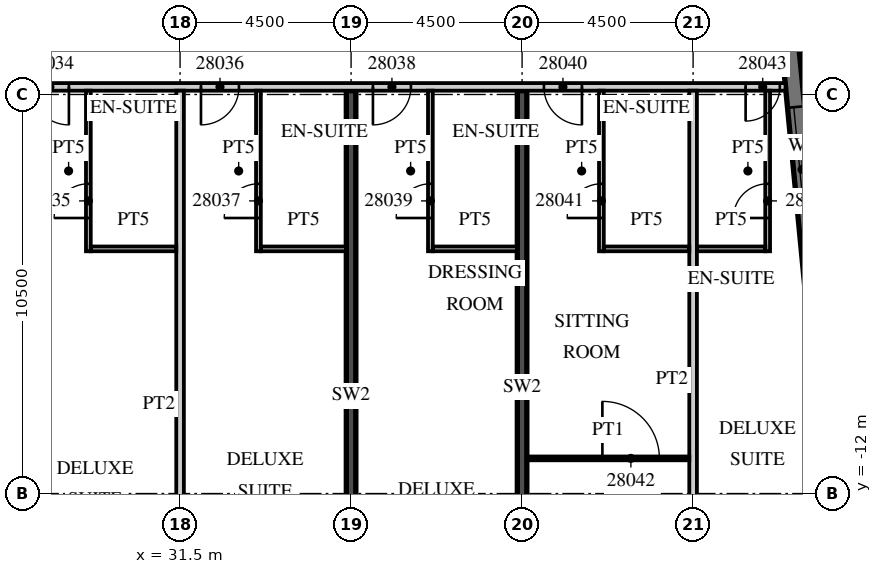
"""IFC4 building model, lengths in metres.
Left out: names, types, materials, properties, quantities, classifications, styles, units other than length and angle.
Written with IfcOpenShell. Run it as: python <this file> out.ifc"""

import sys

from ifc_helpers import new_model, si_unit, direction, frame, frame_2d, origin, place, context, subcontext, project, spatial, rectangle, extrude, element, fill, save


model = new_model("IFC4")
c1 = context("Model", 3, precision=1e-05, world=origin(), true_north=direction((0.0, 1.0)))
c2 = subcontext(c1, "Body", "Model", "MODEL_VIEW")
j1 = project(units=[si_unit("LENGTHUNIT", "METRE"), si_unit("PLANEANGLEUNIT", "RADIAN")], contexts=[c1])
p1 = place(None, origin())
s1 = spatial("IfcSite", under=j1, at=p1, CompositionType="ELEMENT")
p2 = place(p1, origin())
s2 = spatial("IfcBuilding", under=s1, at=p2, CompositionType="ELEMENT")
p3 = place(p2, frame((0.0, 0.0, 127.3)))
s3 = spatial("IfcBuildingStorey", under=s2, at=p3, CompositionType="ELEMENT", Elevation=127.3)
p4 = place(p3, frame((36.0, -17.444, 0.0), z_axis=(0.0, 0.0, 1.0), x_axis=(0.0, 1.0, 0.0)))
e1 = element("IfcWall", 1, at=p4, inside=s3, PredefinedType="SHEAR", context=c2, shape_type="SweptSolid", body=[
    extrude(rectangle(XDim=16.044, YDim=0.25, at=frame_2d((8.022, 0.0))), origin(), (0.0, 0.0, 1.0), 3.3),
])
p5 = place(p3, frame((40.5, -17.011, 0.0), z_axis=(0.0, 0.0, 1.0), x_axis=(0.0, 1.0, 0.0)))
e2 = element("IfcWall", 2, at=p5, inside=s3, PredefinedType="SHEAR", context=c2, shape_type="SweptSolid", body=[
    extrude(rectangle(XDim=15.611, YDim=0.25, at=frame_2d((7.805, 0.0))), origin(), (0.0, 0.0, 1.0), 3.3),
])
p6 = place(p3, frame((48.753, -12.672, 0.0), z_axis=(0.0, 0.0, 1.0), x_axis=(-0.095842661909, 0.995396495954, 0.0)))
e3 = element("IfcWall", 3, at=p6, inside=s3, PredefinedType="SOLIDWALL", context=c2, shape_type="SweptSolid", body=[
    extrude(rectangle(XDim=35.0, YDim=0.45, at=frame_2d((17.5, 0.0))), origin(), (0.0, 0.0, 1.0), 3.02),
])
p7 = place(p6, frame((3.072, 0.0, 0.45)))
e4 = element("IfcOpeningElement", 4, at=p7, cuts=e3, PredefinedType="OPENING", context=c2, shape_type="SweptSolid", body=[
    extrude(rectangle(XDim=3.3, YDim=2.25, at=frame_2d((1.65, 1.125))), frame((0.0, 0.235, 0.0), z_axis=(0.0, -1.0, 0.0), x_axis=(1.0, 0.0, 0.0)), (0.0, 0.0, 1.0), 0.47),
])
p8 = place(p6, frame((7.593, 0.0, 0.45)))
e5 = element("IfcOpeningElement", 5, at=p8, cuts=e3, PredefinedType="OPENING", context=c2, shape_type="SweptSolid", body=[
    extrude(rectangle(XDim=3.3, YDim=2.25, at=frame_2d((1.65, 1.125))), frame((0.0, 0.235, 0.0), z_axis=(0.0, -1.0, 0.0), x_axis=(1.0, 0.0, 0.0)), (0.0, 0.0, 1.0), 0.47),
])
p9 = place(p3, frame((-13.5, -1.3, 0.0), z_axis=(0.0, 0.0, 1.0), x_axis=(1.0, 0.0, 0.0)))
e6 = element("IfcWall", 6, at=p9, inside=s3, PredefinedType="PARTITIONING", context=c2, shape_type="SweptSolid", body=[
    extrude(rectangle(XDim=60.932, YDim=0.2, at=frame_2d((30.466, 0.0))), origin(), (0.0, 0.0, 1.0), 3.02),
])
p10 = place(p9, frame((2.925, 0.0, 0.0)))
e7 = element("IfcOpeningElement", 7, at=p10, cuts=e6, PredefinedType="OPENING", context=c2, shape_type="SweptSolid", body=[
    extrude(rectangle(XDim=1.0, YDim=2.1, at=frame_2d((0.5, 1.05))), frame((0.0, 0.11, 0.0), z_axis=(0.0, -1.0, 0.0), x_axis=(1.0, 0.0, 0.0)), (0.0, 0.0, 1.0), 0.22),
])
p11 = place(p9, frame((9.863, 0.0, 0.0)))
e8 = element("IfcOpeningElement", 8, at=p11, cuts=e6, PredefinedType="OPENING", context=c2, shape_type="SweptSolid", body=[
    extrude(rectangle(XDim=1.2, YDim=2.1, at=frame_2d((0.6, 1.05))), frame((0.0, 0.11, 0.0), z_axis=(0.0, -1.0, 0.0), x_axis=(1.0, 0.0, 0.0)), (0.0, 0.0, 1.0), 0.22),
])
p12 = place(p9, frame((15.938, 0.0, 0.0)))
e9 = element("IfcOpeningElement", 9, at=p12, cuts=e6, PredefinedType="OPENING", context=c2, shape_type="SweptSolid", body=[
    extrude(rectangle(XDim=1.2, YDim=2.1, at=frame_2d((0.6, 1.05))), frame((0.0, 0.11, 0.0), z_axis=(0.0, -1.0, 0.0), x_axis=(1.0, 0.0, 0.0)), (0.0, 0.0, 1.0), 0.22),
])
p13 = place(p9, frame((27.862, 0.0, 0.0)))
e10 = element("IfcOpeningElement", 10, at=p13, cuts=e6, PredefinedType="OPENING", context=c2, shape_type="SweptSolid", body=[
    extrude(rectangle(XDim=1.2, YDim=2.1, at=frame_2d((0.6, 1.05))), frame((0.0, 0.11, 0.0), z_axis=(0.0, -1.0, 0.0), x_axis=(1.0, 0.0, 0.0)), (0.0, 0.0, 1.0), 0.22),
])
p14 = place(p9, frame((34.45, 0.0, 0.0)))
e11 = element("IfcOpeningElement", 11, at=p14, cuts=e6, PredefinedType="OPENING", context=c2, shape_type="SweptSolid", body=[
    extrude(rectangle(XDim=1.0, YDim=2.1, at=frame_2d((0.5, 1.05))), frame((0.0, 0.11, 0.0), z_axis=(0.0, -1.0, 0.0), x_axis=(1.0, 0.0, 0.0)), (0.0, 0.0, 1.0), 0.22),
])
p15 = place(p9, frame((36.55, 0.0, 0.0)))
e12 = element("IfcOpeningElement", 12, at=p15, cuts=e6, PredefinedType="OPENING", context=c2, shape_type="SweptSolid", body=[
    extrude(rectangle(XDim=1.0, YDim=2.1, at=frame_2d((0.5, 1.05))), frame((0.0, 0.11, 0.0), z_axis=(0.0, -1.0, 0.0), x_axis=(1.0, 0.0, 0.0)), (0.0, 0.0, 1.0), 0.22),
])
p16 = place(p9, frame((41.075, 0.0, 0.0)))
e13 = element("IfcOpeningElement", 13, at=p16, cuts=e6, PredefinedType="OPENING", context=c2, shape_type="SweptSolid", body=[
    extrude(rectangle(XDim=1.0, YDim=2.1, at=frame_2d((0.5, 1.05))), frame((0.0, 0.11, 0.0), z_axis=(0.0, -1.0, 0.0), x_axis=(1.0, 0.0, 0.0)), (0.0, 0.0, 1.0), 0.22),
])
p17 = place(p9, frame((45.55, 0.0, 0.0)))
e14 = element("IfcOpeningElement", 14, at=p17, cuts=e6, PredefinedType="OPENING", context=c2, shape_type="SweptSolid", body=[
    extrude(rectangle(XDim=1.0, YDim=2.1, at=frame_2d((0.5, 1.05))), frame((0.0, 0.11, 0.0), z_axis=(0.0, -1.0, 0.0), x_axis=(1.0, 0.0, 0.0)), (0.0, 0.0, 1.0), 0.22),
])
p18 = place(p9, frame((50.075, 0.0, 0.0)))
e15 = element("IfcOpeningElement", 15, at=p18, cuts=e6, PredefinedType="OPENING", context=c2, shape_type="SweptSolid", body=[
    extrude(rectangle(XDim=1.0, YDim=2.1, at=frame_2d((0.5, 1.05))), frame((0.0, 0.11, 0.0), z_axis=(0.0, -1.0, 0.0), x_axis=(1.0, 0.0, 0.0)), (0.0, 0.0, 1.0), 0.22),
])
p19 = place(p9, frame((54.575, 0.0, 0.0)))
e16 = element("IfcOpeningElement", 16, at=p19, cuts=e6, PredefinedType="OPENING", context=c2, shape_type="SweptSolid", body=[
    extrude(rectangle(XDim=1.0, YDim=2.1, at=frame_2d((0.5, 1.05))), frame((0.0, 0.11, 0.0), z_axis=(0.0, -1.0, 0.0), x_axis=(1.0, 0.0, 0.0)), (0.0, 0.0, 1.0), 0.22),
])
p20 = place(p9, frame((59.882, 0.0, 0.0)))
e17 = element("IfcOpeningElement", 17, at=p20, cuts=e6, PredefinedType="OPENING", context=c2, shape_type="SweptSolid", body=[
    extrude(rectangle(XDim=0.9, YDim=2.1, at=frame_2d((0.45, 1.05))), frame((0.0, 0.11, 0.0), z_axis=(0.0, -1.0, 0.0), x_axis=(1.0, 0.0, 0.0)), (0.0, 0.0, 1.0), 0.22),
])
p21 = place(p3, frame((31.5, -17.899, 0.0), z_axis=(0.0, 0.0, 1.0), x_axis=(0.0, 1.0, 0.0)))
e18 = element("IfcWall", 18, at=p21, inside=s3, PredefinedType="PARTITIONING", context=c2, shape_type="SweptSolid", body=[
    extrude(rectangle(XDim=16.499, YDim=0.2, at=frame_2d((8.25, 0.0))), origin(), (0.0, 0.0, 1.0), 3.02),
])
p22 = place(p3, frame((29.087, -5.625, 0.0), z_axis=(0.0, 0.0, 1.0), x_axis=(0.0, 1.0, 0.0)))
e19 = element("IfcWall", 19, at=p22, inside=s3, PredefinedType="PARTITIONING", context=c2, shape_type="SweptSolid", body=[
    extrude(rectangle(XDim=4.225, YDim=0.125, at=frame_2d((2.113, 0.0))), origin(), (0.0, 0.0, 1.0), 3.02),
])
p23 = place(p22, frame((0.875, 0.0, 0.0)))
e20 = element("IfcOpeningElement", 20, at=p23, cuts=e19, PredefinedType="OPENING", context=c2, shape_type="SweptSolid", body=[
    extrude(rectangle(XDim=0.9, YDim=2.1, at=frame_2d((0.45, 1.05))), frame((0.0, 0.073, 0.0), z_axis=(0.0, -1.0, 0.0), x_axis=(1.0, 0.0, 0.0)), (0.0, 0.0, 1.0), 0.145),
])
p24 = place(p3, frame((29.15, -5.562, 0.0), z_axis=(0.0, 0.0, 1.0), x_axis=(1.0, 0.0, 0.0)))
e21 = element("IfcWall", 21, at=p24, inside=s3, PredefinedType="PARTITIONING", context=c2, shape_type="SweptSolid", body=[
    extrude(rectangle(XDim=2.25, YDim=0.125, at=frame_2d((1.125, 0.0))), origin(), (0.0, 0.0, 1.0), 3.02),
])
p25 = place(p3, frame((33.562, -5.625, 0.0), z_axis=(0.0, 0.0, 1.0), x_axis=(0.0, 1.0, 0.0)))
e22 = element("IfcWall", 22, at=p25, inside=s3, PredefinedType="PARTITIONING", context=c2, shape_type="SweptSolid", body=[
    extrude(rectangle(XDim=4.225, YDim=0.125, at=frame_2d((2.113, 0.0))), origin(), (0.0, 0.0, 1.0), 3.02),
])
p26 = place(p25, frame((0.875, 0.0, 0.0)))
e23 = element("IfcOpeningElement", 23, at=p26, cuts=e22, PredefinedType="OPENING", context=c2, shape_type="SweptSolid", body=[
    extrude(rectangle(XDim=0.9, YDim=2.1, at=frame_2d((0.45, 1.05))), frame((0.0, 0.073, 0.0), z_axis=(0.0, -1.0, 0.0), x_axis=(1.0, 0.0, 0.0)), (0.0, 0.0, 1.0), 0.145),
])
p27 = place(p3, frame((33.625, -5.562, 0.0), z_axis=(0.0, 0.0, 1.0), x_axis=(1.0, 0.0, 0.0)))
e24 = element("IfcWall", 24, at=p27, inside=s3, PredefinedType="PARTITIONING", context=c2, shape_type="SweptSolid", body=[
    extrude(rectangle(XDim=2.25, YDim=0.125, at=frame_2d((1.125, 0.0))), origin(), (0.0, 0.0, 1.0), 3.02),
])
p28 = place(p3, frame((38.087, -5.625, 0.0), z_axis=(0.0, 0.0, 1.0), x_axis=(0.0, 1.0, 0.0)))
e25 = element("IfcWall", 25, at=p28, inside=s3, PredefinedType="PARTITIONING", context=c2, shape_type="SweptSolid", body=[
    extrude(rectangle(XDim=4.225, YDim=0.125, at=frame_2d((2.113, 0.0))), origin(), (0.0, 0.0, 1.0), 3.02),
])
p29 = place(p28, frame((0.875, 0.0, 0.0)))
e26 = element("IfcOpeningElement", 26, at=p29, cuts=e25, PredefinedType="OPENING", context=c2, shape_type="SweptSolid", body=[
    extrude(rectangle(XDim=0.9, YDim=2.1, at=frame_2d((0.45, 1.05))), frame((0.0, 0.073, 0.0), z_axis=(0.0, -1.0, 0.0), x_axis=(1.0, 0.0, 0.0)), (0.0, 0.0, 1.0), 0.145),
])
p30 = place(p3, frame((38.15, -5.562, 0.0), z_axis=(0.0, 0.0, 1.0), x_axis=(1.0, 0.0, 0.0)))
e27 = element("IfcWall", 27, at=p30, inside=s3, PredefinedType="PARTITIONING", context=c2, shape_type="SweptSolid", body=[
    extrude(rectangle(XDim=2.225, YDim=0.125, at=frame_2d((1.113, 0.0))), origin(), (0.0, 0.0, 1.0), 3.02),
])
p31 = place(p3, frame((45.0, -16.599, 0.0), z_axis=(0.0, 0.0, 1.0), x_axis=(0.0, 1.0, 0.0)))
e28 = element("IfcWall", 28, at=p31, inside=s3, PredefinedType="PARTITIONING", context=c2, shape_type="SweptSolid", body=[
    extrude(rectangle(XDim=15.199, YDim=0.2, at=frame_2d((7.6, 0.0))), origin(), (0.0, 0.0, 1.0), 3.02),
])
p32 = place(p3, frame((42.587, -5.625, 0.0), z_axis=(0.0, 0.0, 1.0), x_axis=(0.0, 1.0, 0.0)))
e29 = element("IfcWall", 29, at=p32, inside=s3, PredefinedType="PARTITIONING", context=c2, shape_type="SweptSolid", body=[
    extrude(rectangle(XDim=4.225, YDim=0.125, at=frame_2d((2.113, 0.0))), origin(), (0.0, 0.0, 1.0), 3.02),
])
p33 = place(p32, frame((0.875, 0.0, 0.0)))
e30 = element("IfcOpeningElement", 30, at=p33, cuts=e29, PredefinedType="OPENING", context=c2, shape_type="SweptSolid", body=[
    extrude(rectangle(XDim=0.9, YDim=2.1, at=frame_2d((0.45, 1.05))), frame((0.0, 0.073, 0.0), z_axis=(0.0, -1.0, 0.0), x_axis=(1.0, 0.0, 0.0)), (0.0, 0.0, 1.0), 0.145),
])
p34 = place(p3, frame((42.65, -5.562, 0.0), z_axis=(0.0, 0.0, 1.0), x_axis=(1.0, 0.0, 0.0)))
e31 = element("IfcWall", 31, at=p34, inside=s3, PredefinedType="PARTITIONING", context=c2, shape_type="SweptSolid", body=[
    extrude(rectangle(XDim=2.25, YDim=0.125, at=frame_2d((1.125, 0.0))), origin(), (0.0, 0.0, 1.0), 3.02),
])
p35 = place(p3, frame((40.625, -11.075, 0.0), z_axis=(0.0, 0.0, 1.0), x_axis=(1.0, 0.0, 0.0)))
e32 = element("IfcWall", 32, at=p35, inside=s3, PredefinedType="PARTITIONING", context=c2, shape_type="SweptSolid", body=[
    extrude(rectangle(XDim=4.275, YDim=0.1, at=frame_2d((2.137, 0.0))), origin(), (0.0, 0.0, 1.0), 3.02),
])
p36 = place(p35, frame((1.988, 0.0, 0.0)))
e33 = element("IfcOpeningElement", 33, at=p36, cuts=e32, PredefinedType="OPENING", context=c2, shape_type="SweptSolid", body=[
    extrude(rectangle(XDim=1.5, YDim=2.1, at=frame_2d((0.75, 1.05))), frame((0.0, 0.06, 0.0), z_axis=(0.0, -1.0, 0.0), x_axis=(1.0, 0.0, 0.0)), (0.0, 0.0, 1.0), 0.12),
])
p37 = place(p3, frame((46.962, -5.625, 0.0), z_axis=(0.0, 0.0, 1.0), x_axis=(0.0, 1.0, 0.0)))
e34 = element("IfcWall", 34, at=p37, inside=s3, PredefinedType="PARTITIONING", context=c2, shape_type="SweptSolid", body=[
    extrude(rectangle(XDim=4.225, YDim=0.125, at=frame_2d((2.113, 0.0))), origin(), (0.0, 0.0, 1.0), 3.02),
])
p38 = place(p37, frame((0.875, 0.0, 0.0)))
e35 = element("IfcOpeningElement", 35, at=p38, cuts=e34, PredefinedType="OPENING", context=c2, shape_type="SweptSolid", body=[
    extrude(rectangle(XDim=0.9, YDim=2.1, at=frame_2d((0.45, 1.05))), frame((0.0, 0.073, 0.0), z_axis=(0.0, -1.0, 0.0), x_axis=(1.0, 0.0, 0.0)), (0.0, 0.0, 1.0), 0.145),
])
p39 = place(p3, frame((45.1, -5.562, 0.0), z_axis=(0.0, 0.0, 1.0), x_axis=(1.0, 0.0, 0.0)))
e36 = element("IfcWall", 36, at=p39, inside=s3, PredefinedType="PARTITIONING", context=c2, shape_type="SweptSolid", body=[
    extrude(rectangle(XDim=1.8, YDim=0.125, at=frame_2d((0.9, 0.0))), origin(), (0.0, 0.0, 1.0), 3.02),
])
p40 = place(p8, origin())
e37 = element("IfcWindow", 37, at=p40, inside=s3, PartitioningType="SINGLE_PANEL", PredefinedType="WINDOW", context=c2, shape_type="SweptSolid", body=[
    extrude(rectangle(XDim=3.3, YDim=2.25, at=frame_2d((1.65, 1.125))), frame((0.0, 0.09, 0.0), z_axis=(0.0, -1.0, 0.0), x_axis=(1.0, 0.0, 0.0)), (0.0, 0.0, 1.0), 0.06),
])
fill(e5, e37)
p41 = place(p16, origin())
e38 = element("IfcDoor", 38, at=p41, inside=s3, OperationType="SINGLE_SWING_RIGHT", PredefinedType="DOOR", context=c2, shape_type="SweptSolid", body=[
    extrude(rectangle(XDim=1.0, YDim=2.1, at=frame_2d((0.5, 1.05))), frame((0.0, 0.025, 0.0), z_axis=(0.0, -1.0, 0.0), x_axis=(1.0, 0.0, 0.0)), (0.0, 0.0, 1.0), 0.05),
])
fill(e13, e38)
p42 = place(p23, origin())
e39 = element("IfcDoor", 39, at=p42, inside=s3, OperationType="SINGLE_SWING_LEFT", PredefinedType="DOOR", context=c2, shape_type="SweptSolid", body=[
    extrude(rectangle(XDim=0.9, YDim=2.1, at=frame_2d((0.45, 1.05))), frame((0.0, 0.025, 0.0), z_axis=(0.0, -1.0, 0.0), x_axis=(1.0, 0.0, 0.0)), (0.0, 0.0, 1.0), 0.05),
])
fill(e20, e39)
p43 = place(p17, origin())
e40 = element("IfcDoor", 40, at=p43, inside=s3, OperationType="SINGLE_SWING_LEFT", PredefinedType="DOOR", context=c2, shape_type="SweptSolid", body=[
    extrude(rectangle(XDim=1.0, YDim=2.1, at=frame_2d((0.5, 1.05))), frame((0.0, 0.025, 0.0), z_axis=(0.0, -1.0, 0.0), x_axis=(1.0, 0.0, 0.0)), (0.0, 0.0, 1.0), 0.05),
])
fill(e14, e40)
p44 = place(p26, origin())
e41 = element("IfcDoor", 41, at=p44, inside=s3, OperationType="SINGLE_SWING_LEFT", PredefinedType="DOOR", context=c2, shape_type="SweptSolid", body=[
    extrude(rectangle(XDim=0.9, YDim=2.1, at=frame_2d((0.45, 1.05))), frame((0.0, 0.025, 0.0), z_axis=(0.0, -1.0, 0.0), x_axis=(1.0, 0.0, 0.0)), (0.0, 0.0, 1.0), 0.05),
])
fill(e23, e41)
p45 = place(p18, origin())
e42 = element("IfcDoor", 42, at=p45, inside=s3, OperationType="SINGLE_SWING_LEFT", PredefinedType="DOOR", context=c2, shape_type="SweptSolid", body=[
    extrude(rectangle(XDim=1.0, YDim=2.1, at=frame_2d((0.5, 1.05))), frame((0.0, 0.025, 0.0), z_axis=(0.0, -1.0, 0.0), x_axis=(1.0, 0.0, 0.0)), (0.0, 0.0, 1.0), 0.05),
])
fill(e15, e42)
p46 = place(p29, origin())
e43 = element("IfcDoor", 43, at=p46, inside=s3, OperationType="SINGLE_SWING_LEFT", PredefinedType="DOOR", context=c2, shape_type="SweptSolid", body=[
    extrude(rectangle(XDim=0.9, YDim=2.1, at=frame_2d((0.45, 1.05))), frame((0.0, 0.025, 0.0), z_axis=(0.0, -1.0, 0.0), x_axis=(1.0, 0.0, 0.0)), (0.0, 0.0, 1.0), 0.05),
])
fill(e26, e43)
p47 = place(p19, origin())
e44 = element("IfcDoor", 44, at=p47, inside=s3, OperationType="SINGLE_SWING_RIGHT", PredefinedType="DOOR", context=c2, shape_type="SweptSolid", body=[
    extrude(rectangle(XDim=1.0, YDim=2.1, at=frame_2d((0.5, 1.05))), frame((0.0, 0.025, 0.0), z_axis=(0.0, -1.0, 0.0), x_axis=(1.0, 0.0, 0.0)), (0.0, 0.0, 1.0), 0.05),
])
fill(e16, e44)
p48 = place(p33, origin())
e45 = element("IfcDoor", 45, at=p48, inside=s3, OperationType="SINGLE_SWING_LEFT", PredefinedType="DOOR", context=c2, shape_type="SweptSolid", body=[
    extrude(rectangle(XDim=0.9, YDim=2.1, at=frame_2d((0.45, 1.05))), frame((0.0, 0.025, 0.0), z_axis=(0.0, -1.0, 0.0), x_axis=(1.0, 0.0, 0.0)), (0.0, 0.0, 1.0), 0.05),
])
fill(e30, e45)
p49 = place(p36, origin())
e46 = element("IfcDoor", 46, at=p49, inside=s3, OperationType="SINGLE_SWING_LEFT", PredefinedType="DOOR", context=c2, shape_type="SweptSolid", body=[
    extrude(rectangle(XDim=1.5, YDim=2.1, at=frame_2d((0.75, 1.05))), frame((0.0, 0.025, 0.0), z_axis=(0.0, -1.0, 0.0), x_axis=(1.0, 0.0, 0.0)), (0.0, 0.0, 1.0), 0.05),
])
fill(e33, e46)
p50 = place(p20, origin())
e47 = element("IfcDoor", 47, at=p50, inside=s3, OperationType="SINGLE_SWING_LEFT", PredefinedType="DOOR", context=c2, shape_type="SweptSolid", body=[
    extrude(rectangle(XDim=0.9, YDim=2.1, at=frame_2d((0.45, 1.05))), frame((0.0, 0.025, 0.0), z_axis=(0.0, -1.0, 0.0), x_axis=(1.0, 0.0, 0.0)), (0.0, 0.0, 1.0), 0.05),
])
fill(e17, e47)
p51 = place(p38, origin())
e48 = element("IfcDoor", 48, at=p51, inside=s3, OperationType="SINGLE_SWING_LEFT", PredefinedType="DOOR", context=c2, shape_type="SweptSolid", body=[
    extrude(rectangle(XDim=0.9, YDim=2.1, at=frame_2d((0.45, 1.05))), frame((0.0, 0.025, 0.0), z_axis=(0.0, -1.0, 0.0), x_axis=(1.0, 0.0, 0.0)), (0.0, 0.0, 1.0), 0.05),
])
fill(e35, e48)
save(model, sys.argv[1])
